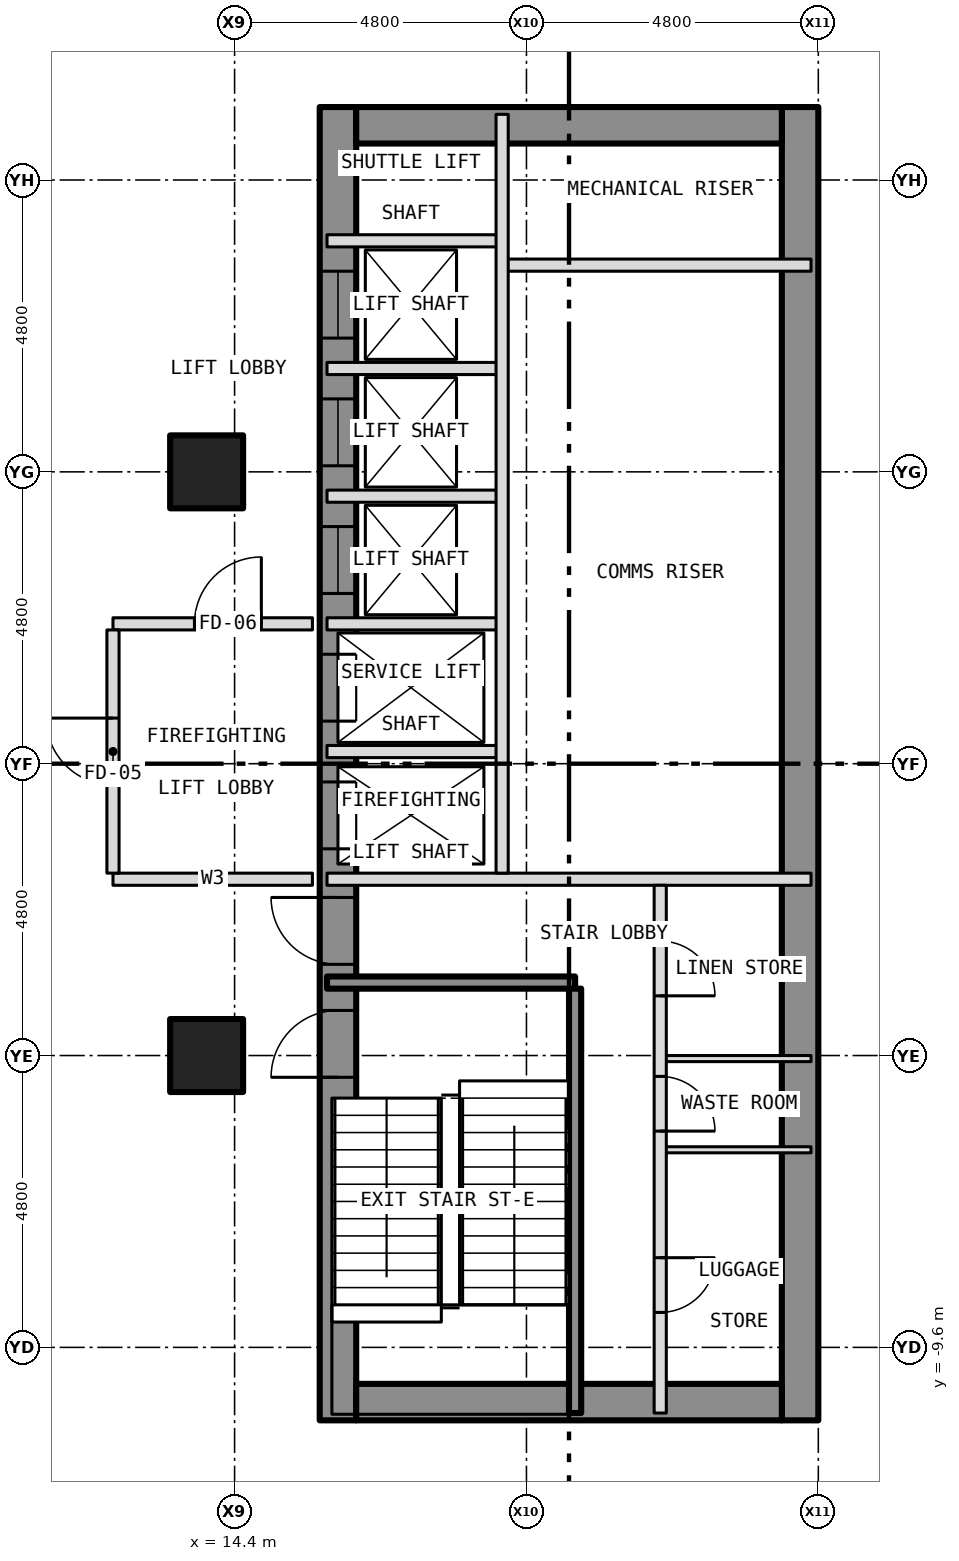
"""IFC4 building model, lengths in metres.
Left out: names, types, materials, properties, quantities, classifications, styles, units other than length and angle.
Written with IfcOpenShell. Run it as: python <this file> out.ifc"""

import sys

from ifc_helpers import new_model, si_unit, direction, frame, frame_2d, origin, origin_2d, place, context, subcontext, project, spatial, rectangle, hollow_rectangle, extrude, element, fill, save


model = new_model("IFC4")
c1 = context("Model", 3, precision=1e-05, world=origin(), true_north=direction((0.0, 1.0)))
c2 = subcontext(c1, "Body", "Model", "MODEL_VIEW")
j1 = project(units=[si_unit("LENGTHUNIT", "METRE"), si_unit("PLANEANGLEUNIT", "RADIAN")], contexts=[c1])
p1 = place(None, origin())
s1 = spatial("IfcSite", under=j1, at=p1, CompositionType="ELEMENT")
p2 = place(p1, origin())
s2 = spatial("IfcBuilding", under=s1, at=p2, CompositionType="ELEMENT")
p3 = place(p2, frame((0.0, 0.0, 24.5)))
s3 = spatial("IfcBuildingStorey", under=s2, at=p3, CompositionType="ELEMENT", Elevation=24.5)
for number, where, z_axis, x_axis in (
    (1, (13.94, -4.8, -0.2), (0.0, 0.0, 1.0), (1.0, 0.0, 0.0)),
    (2, (13.94, 4.8, -0.2), (0.0, 0.0, 1.0), (1.0, 0.0, 0.0)),
):
    element("IfcColumn", number, at=place(p3, frame(where, z_axis=z_axis, x_axis=x_axis)), inside=s3, PredefinedType="COLUMN", context=c2, shape_type="SweptSolid", body=[
        extrude(hollow_rectangle(XDim=1.2, YDim=1.2, WallThickness=0.07, at=origin_2d()), origin(), (0.0, 0.0, 1.0), 4.5),
    ])
p4 = place(p3, frame((16.1, -10.8, 0.0), z_axis=(0.0, 0.0, 1.0), x_axis=(0.0, 1.0, 0.0)))
e3 = element("IfcWall", 3, at=p4, inside=s3, PredefinedType="SHEAR", context=c2, shape_type="SweptSolid", body=[
    extrude(rectangle(XDim=21.6, YDim=0.6, at=frame_2d((10.8, 0.0))), origin(), (0.0, 0.0, 1.0), 4.2),
])
p5 = place(p4, frame((9.4, 0.0, 0.0)))
e4 = element("IfcOpeningElement", 4, at=p5, cuts=e3, PredefinedType="OPENING", context=c2, shape_type="SweptSolid", body=[
    extrude(rectangle(XDim=1.1, YDim=2.1, at=frame_2d((0.55, 1.05))), frame((0.0, 0.312, 0.0), z_axis=(0.0, -1.0, 0.0), x_axis=(1.0, 0.0, 0.0)), (0.0, 0.0, 1.0), 0.624),
])
p6 = place(p4, frame((11.5, 0.0, 0.0)))
e5 = element("IfcOpeningElement", 5, at=p6, cuts=e3, PredefinedType="OPENING", context=c2, shape_type="SweptSolid", body=[
    extrude(rectangle(XDim=1.1, YDim=2.1, at=frame_2d((0.55, 1.05))), frame((0.0, 0.312, 0.0), z_axis=(0.0, -1.0, 0.0), x_axis=(1.0, 0.0, 0.0)), (0.0, 0.0, 1.0), 0.624),
])
p7 = place(p4, frame((13.6, 0.0, 0.0)))
e6 = element("IfcOpeningElement", 6, at=p7, cuts=e3, PredefinedType="OPENING", context=c2, shape_type="SweptSolid", body=[
    extrude(rectangle(XDim=1.1, YDim=2.1, at=frame_2d((0.55, 1.05))), frame((0.0, 0.312, 0.0), z_axis=(0.0, -1.0, 0.0), x_axis=(1.0, 0.0, 0.0)), (0.0, 0.0, 1.0), 0.624),
])
p8 = place(p4, frame((15.7, 0.0, 0.0)))
e7 = element("IfcOpeningElement", 7, at=p8, cuts=e3, PredefinedType="OPENING", context=c2, shape_type="SweptSolid", body=[
    extrude(rectangle(XDim=1.1, YDim=2.1, at=frame_2d((0.55, 1.05))), frame((0.0, 0.312, 0.0), z_axis=(0.0, -1.0, 0.0), x_axis=(1.0, 0.0, 0.0)), (0.0, 0.0, 1.0), 0.624),
])
p9 = place(p4, frame((17.8, 0.0, 0.0)))
e8 = element("IfcOpeningElement", 8, at=p9, cuts=e3, PredefinedType="OPENING", context=c2, shape_type="SweptSolid", body=[
    extrude(rectangle(XDim=1.1, YDim=2.1, at=frame_2d((0.55, 1.05))), frame((0.0, 0.312, 0.0), z_axis=(0.0, -1.0, 0.0), x_axis=(1.0, 0.0, 0.0)), (0.0, 0.0, 1.0), 0.624),
])
p10 = place(p4, frame((5.642, 0.0, 0.0)))
e9 = element("IfcOpeningElement", 9, at=p10, cuts=e3, PredefinedType="OPENING", context=c2, shape_type="SweptSolid", body=[
    extrude(rectangle(XDim=1.1, YDim=2.1, at=frame_2d((0.55, 1.05))), frame((0.0, 0.312, 0.0), z_axis=(0.0, -1.0, 0.0), x_axis=(1.0, 0.0, 0.0)), (0.0, 0.0, 1.0), 0.624),
])
p11 = place(p4, frame((7.5, 0.0, 0.0)))
e10 = element("IfcOpeningElement", 10, at=p11, cuts=e3, PredefinedType="OPENING", context=c2, shape_type="SweptSolid", body=[
    extrude(rectangle(XDim=1.1, YDim=2.1, at=frame_2d((0.55, 1.05))), frame((0.0, 0.312, 0.0), z_axis=(0.0, -1.0, 0.0), x_axis=(1.0, 0.0, 0.0)), (0.0, 0.0, 1.0), 0.624),
])
p12 = place(p3, frame((23.7, -10.8, 0.0), z_axis=(0.0, 0.0, 1.0), x_axis=(0.0, 1.0, 0.0)))
e11 = element("IfcWall", 11, at=p12, inside=s3, PredefinedType="SHEAR", context=c2, shape_type="SweptSolid", body=[
    extrude(rectangle(XDim=21.6, YDim=0.6, at=frame_2d((10.8, 0.0))), origin(), (0.0, 0.0, 1.0), 4.2),
])
for number, where, z_axis, x_axis in (
    (12, (16.4, 10.5, 0.0), (0.0, 0.0, 1.0), (1.0, 0.0, 0.0)),
    (13, (16.4, -10.5, 0.0), (0.0, 0.0, 1.0), (1.0, 0.0, 0.0)),
):
    element("IfcWall", number, at=place(p3, frame(where, z_axis=z_axis, x_axis=x_axis)), inside=s3, PredefinedType="SHEAR", context=c2, shape_type="SweptSolid", body=[
        extrude(rectangle(XDim=7.0, YDim=0.6, at=frame_2d((3.5, 0.0))), origin(), (0.0, 0.0, 1.0), 4.2),
    ])
for number, where, z_axis, x_axis in (
    (14, (21.4, -6.35, 0.0), (0.0, 0.0, 1.0), (1.0, 0.0, 0.0)),
    (15, (21.4, -4.85, 0.0), (0.0, 0.0, 1.0), (1.0, 0.0, 0.0)),
):
    element("IfcWall", number, at=place(p3, frame(where, z_axis=z_axis, x_axis=x_axis)), inside=s3, PredefinedType="PARTITIONING", context=c2, shape_type="SweptSolid", body=[
        extrude(rectangle(XDim=2.48, YDim=0.1, at=frame_2d((1.24, 0.0))), origin(), (0.0, 0.0, 1.0), 4.2),
    ])
p13 = place(p3, frame((15.92, -3.6, 0.0), z_axis=(0.0, 0.0, 1.0), x_axis=(1.0, 0.0, 0.0)))
e16 = element("IfcWall", 16, at=p13, inside=s3, PredefinedType="SHEAR", context=c2, shape_type="SweptSolid", body=[
    extrude(rectangle(XDim=4.08, YDim=0.2, at=frame_2d((2.04, 0.0))), origin(), (0.0, 0.0, 1.0), 4.2),
])
p14 = place(p3, frame((12.4, -1.9, 0.0), z_axis=(0.0, 0.0, 1.0), x_axis=(1.0, 0.0, 0.0)))
e17 = element("IfcWall", 17, at=p14, inside=s3, PredefinedType="PARTITIONING", context=c2, shape_type="SweptSolid", body=[
    extrude(rectangle(XDim=3.28, YDim=0.2, at=frame_2d((1.64, 0.0))), origin(), (0.0, 0.0, 1.0), 4.3),
])
p15 = place(p3, frame((15.92, -1.9, 0.0), z_axis=(0.0, 0.0, 1.0), x_axis=(1.0, 0.0, 0.0)))
e18 = element("IfcWall", 18, at=p15, inside=s3, PredefinedType="PARTITIONING", context=c2, shape_type="SweptSolid", body=[
    extrude(rectangle(XDim=7.96, YDim=0.2, at=frame_2d((3.98, 0.0))), origin(), (0.0, 0.0, 1.0), 4.2),
])
p16 = place(p3, frame((15.92, 0.2, 0.0), z_axis=(0.0, 0.0, 1.0), x_axis=(1.0, 0.0, 0.0)))
e19 = element("IfcWall", 19, at=p16, inside=s3, PredefinedType="PARTITIONING", context=c2, shape_type="SweptSolid", body=[
    extrude(rectangle(XDim=2.88, YDim=0.2, at=frame_2d((1.44, 0.0))), origin(), (0.0, 0.0, 1.0), 4.2),
])
p17 = place(p3, frame((12.4, 2.3, 0.0), z_axis=(0.0, 0.0, 1.0), x_axis=(1.0, 0.0, 0.0)))
e20 = element("IfcWall", 20, at=p17, inside=s3, PredefinedType="PARTITIONING", context=c2, shape_type="SweptSolid", body=[
    extrude(rectangle(XDim=3.28, YDim=0.2, at=frame_2d((1.64, 0.0))), origin(), (0.0, 0.0, 1.0), 4.3),
])
p18 = place(p17, frame((1.34, 0.0, 0.0)))
e21 = element("IfcOpeningElement", 21, at=p18, cuts=e20, PredefinedType="OPENING", context=c2, shape_type="SweptSolid", body=[
    extrude(rectangle(XDim=1.1, YDim=2.1, at=frame_2d((0.55, 1.05))), frame((0.0, 0.112, 0.0), z_axis=(0.0, -1.0, 0.0), x_axis=(1.0, 0.0, 0.0)), (0.0, 0.0, 1.0), 0.224),
])
for number, where, z_axis, x_axis in (
    (22, (15.92, 2.3, 0.0), (0.0, 0.0, 1.0), (1.0, 0.0, 0.0)),
    (23, (15.92, 4.4, 0.0), (0.0, 0.0, 1.0), (1.0, 0.0, 0.0)),
    (24, (15.92, 6.5, 0.0), (0.0, 0.0, 1.0), (1.0, 0.0, 0.0)),
):
    element("IfcWall", number, at=place(p3, frame(where, z_axis=z_axis, x_axis=x_axis)), inside=s3, PredefinedType="PARTITIONING", context=c2, shape_type="SweptSolid", body=[
        extrude(rectangle(XDim=2.88, YDim=0.2, at=frame_2d((1.44, 0.0))), origin(), (0.0, 0.0, 1.0), 4.2),
    ])
p19 = place(p3, frame((18.8, 8.2, 0.0), z_axis=(0.0, 0.0, 1.0), x_axis=(1.0, 0.0, 0.0)))
e25 = element("IfcWall", 25, at=p19, inside=s3, PredefinedType="PARTITIONING", context=c2, shape_type="SweptSolid", body=[
    extrude(rectangle(XDim=5.08, YDim=0.2, at=frame_2d((2.54, 0.0))), origin(), (0.0, 0.0, 1.0), 4.2),
])
p20 = place(p3, frame((15.92, 8.6, 0.0), z_axis=(0.0, 0.0, 1.0), x_axis=(1.0, 0.0, 0.0)))
e26 = element("IfcWall", 26, at=p20, inside=s3, PredefinedType="PARTITIONING", context=c2, shape_type="SweptSolid", body=[
    extrude(rectangle(XDim=2.88, YDim=0.2, at=frame_2d((1.44, 0.0))), origin(), (0.0, 0.0, 1.0), 4.2),
])
p21 = place(p3, frame((12.4, -1.8, 0.0), z_axis=(0.0, 0.0, 1.0), x_axis=(0.0, 1.0, 0.0)))
e27 = element("IfcWall", 27, at=p21, inside=s3, PredefinedType="PARTITIONING", context=c2, shape_type="SweptSolid", body=[
    extrude(rectangle(XDim=4.0, YDim=0.2, at=frame_2d((2.0, 0.0))), origin(), (0.0, 0.0, 1.0), 4.3),
])
p22 = place(p21, frame((1.45, 0.0, 0.0)))
e28 = element("IfcOpeningElement", 28, at=p22, cuts=e27, PredefinedType="OPENING", context=c2, shape_type="SweptSolid", body=[
    extrude(rectangle(XDim=1.1, YDim=2.1, at=frame_2d((0.55, 1.05))), frame((0.0, 0.112, 0.0), z_axis=(0.0, -1.0, 0.0), x_axis=(1.0, 0.0, 0.0)), (0.0, 0.0, 1.0), 0.224),
])
p23 = place(p3, frame((18.8, -1.8, 0.0), z_axis=(0.0, 0.0, 1.0), x_axis=(0.0, 1.0, 0.0)))
e29 = element("IfcWall", 29, at=p23, inside=s3, PredefinedType="PARTITIONING", context=c2, shape_type="SweptSolid", body=[
    extrude(rectangle(XDim=12.48, YDim=0.2, at=frame_2d((6.24, 0.0))), origin(), (0.0, 0.0, 1.0), 4.2),
])
p24 = place(p3, frame((20.0, -10.68, 0.0), z_axis=(0.0, 0.0, 1.0), x_axis=(0.0, 1.0, 0.0)))
e30 = element("IfcWall", 30, at=p24, inside=s3, PredefinedType="SHEAR", context=c2, shape_type="SweptSolid", body=[
    extrude(rectangle(XDim=6.98, YDim=0.2, at=frame_2d((3.49, 0.0))), origin(), (0.0, 0.0, 1.0), 4.2),
])
p25 = place(p3, frame((21.4, -10.68, 0.0), z_axis=(0.0, 0.0, 1.0), x_axis=(0.0, 1.0, 0.0)))
e31 = element("IfcWall", 31, at=p25, inside=s3, PredefinedType="PARTITIONING", context=c2, shape_type="SweptSolid", body=[
    extrude(rectangle(XDim=8.68, YDim=0.2, at=frame_2d((4.34, 0.0))), origin(), (0.0, 0.0, 1.0), 4.2),
])
p26 = place(p25, frame((1.655, 0.0, 0.0)))
e32 = element("IfcOpeningElement", 32, at=p26, cuts=e31, PredefinedType="OPENING", context=c2, shape_type="SweptSolid", body=[
    extrude(rectangle(XDim=0.9, YDim=2.1, at=frame_2d((0.45, 1.05))), frame((0.0, 0.112, 0.0), z_axis=(0.0, -1.0, 0.0), x_axis=(1.0, 0.0, 0.0)), (0.0, 0.0, 1.0), 0.224),
])
p27 = place(p25, frame((4.637, 0.0, 0.0)))
e33 = element("IfcOpeningElement", 33, at=p27, cuts=e31, PredefinedType="OPENING", context=c2, shape_type="SweptSolid", body=[
    extrude(rectangle(XDim=0.9, YDim=2.1, at=frame_2d((0.45, 1.05))), frame((0.0, 0.112, 0.0), z_axis=(0.0, -1.0, 0.0), x_axis=(1.0, 0.0, 0.0)), (0.0, 0.0, 1.0), 0.224),
])
p28 = place(p25, frame((6.862, 0.0, 0.0)))
e34 = element("IfcOpeningElement", 34, at=p28, cuts=e31, PredefinedType="OPENING", context=c2, shape_type="SweptSolid", body=[
    extrude(rectangle(XDim=0.9, YDim=2.1, at=frame_2d((0.45, 1.05))), frame((0.0, 0.112, 0.0), z_axis=(0.0, -1.0, 0.0), x_axis=(1.0, 0.0, 0.0)), (0.0, 0.0, 1.0), 0.224),
])
p29 = place(p5, origin())
e35 = element("IfcDoor", 35, at=p29, inside=s3, OperationType="SLIDING_TO_LEFT", PredefinedType="DOOR", context=c2, shape_type="SweptSolid", body=[
    extrude(rectangle(XDim=1.1, YDim=2.1, at=frame_2d((0.55, 1.05))), frame((0.0, 0.025, 0.0), z_axis=(0.0, -1.0, 0.0), x_axis=(1.0, 0.0, 0.0)), (0.0, 0.0, 1.0), 0.05),
])
fill(e4, e35)
p30 = place(p6, origin())
e36 = element("IfcDoor", 36, at=p30, inside=s3, OperationType="SLIDING_TO_LEFT", PredefinedType="DOOR", context=c2, shape_type="SweptSolid", body=[
    extrude(rectangle(XDim=1.1, YDim=2.1, at=frame_2d((0.55, 1.05))), frame((0.0, 0.025, 0.0), z_axis=(0.0, -1.0, 0.0), x_axis=(1.0, 0.0, 0.0)), (0.0, 0.0, 1.0), 0.05),
])
fill(e5, e36)
p31 = place(p7, origin())
e37 = element("IfcDoor", 37, at=p31, inside=s3, OperationType="SLIDING_TO_LEFT", PredefinedType="DOOR", context=c2, shape_type="SweptSolid", body=[
    extrude(rectangle(XDim=1.1, YDim=2.1, at=frame_2d((0.55, 1.05))), frame((0.0, 0.025, 0.0), z_axis=(0.0, -1.0, 0.0), x_axis=(1.0, 0.0, 0.0)), (0.0, 0.0, 1.0), 0.05),
])
fill(e6, e37)
p32 = place(p8, origin())
e38 = element("IfcDoor", 38, at=p32, inside=s3, OperationType="SLIDING_TO_LEFT", PredefinedType="DOOR", context=c2, shape_type="SweptSolid", body=[
    extrude(rectangle(XDim=1.1, YDim=2.1, at=frame_2d((0.55, 1.05))), frame((0.0, 0.025, 0.0), z_axis=(0.0, -1.0, 0.0), x_axis=(1.0, 0.0, 0.0)), (0.0, 0.0, 1.0), 0.05),
])
fill(e7, e38)
p33 = place(p9, origin())
e39 = element("IfcDoor", 39, at=p33, inside=s3, OperationType="SLIDING_TO_LEFT", PredefinedType="DOOR", context=c2, shape_type="SweptSolid", body=[
    extrude(rectangle(XDim=1.1, YDim=2.1, at=frame_2d((0.55, 1.05))), frame((0.0, 0.025, 0.0), z_axis=(0.0, -1.0, 0.0), x_axis=(1.0, 0.0, 0.0)), (0.0, 0.0, 1.0), 0.05),
])
fill(e8, e39)
p34 = place(p10, origin())
e40 = element("IfcDoor", 40, at=p34, inside=s3, OperationType="SINGLE_SWING_LEFT", PredefinedType="DOOR", context=c2, shape_type="SweptSolid", body=[
    extrude(rectangle(XDim=1.1, YDim=2.1, at=frame_2d((0.55, 1.05))), frame((0.0, 0.025, 0.0), z_axis=(0.0, -1.0, 0.0), x_axis=(1.0, 0.0, 0.0)), (0.0, 0.0, 1.0), 0.05),
])
fill(e9, e40)
p35 = place(p11, origin())
e41 = element("IfcDoor", 41, at=p35, inside=s3, OperationType="SINGLE_SWING_RIGHT", PredefinedType="DOOR", context=c2, shape_type="SweptSolid", body=[
    extrude(rectangle(XDim=1.1, YDim=2.1, at=frame_2d((0.55, 1.05))), frame((0.0, 0.025, 0.0), z_axis=(0.0, -1.0, 0.0), x_axis=(1.0, 0.0, 0.0)), (0.0, 0.0, 1.0), 0.05),
])
fill(e10, e41)
p36 = place(p26, origin())
e42 = element("IfcDoor", 42, at=p36, inside=s3, OperationType="SINGLE_SWING_RIGHT", PredefinedType="DOOR", context=c2, shape_type="SweptSolid", body=[
    extrude(rectangle(XDim=0.9, YDim=2.1, at=frame_2d((0.45, 1.05))), frame((0.0, 0.025, 0.0), z_axis=(0.0, -1.0, 0.0), x_axis=(1.0, 0.0, 0.0)), (0.0, 0.0, 1.0), 0.05),
])
fill(e32, e42)
p37 = place(p27, origin())
e43 = element("IfcDoor", 43, at=p37, inside=s3, OperationType="SINGLE_SWING_LEFT", PredefinedType="DOOR", context=c2, shape_type="SweptSolid", body=[
    extrude(rectangle(XDim=0.9, YDim=2.1, at=frame_2d((0.45, 1.05))), frame((0.0, 0.025, 0.0), z_axis=(0.0, -1.0, 0.0), x_axis=(1.0, 0.0, 0.0)), (0.0, 0.0, 1.0), 0.05),
])
fill(e33, e43)
p38 = place(p28, origin())
e44 = element("IfcDoor", 44, at=p38, inside=s3, OperationType="SINGLE_SWING_LEFT", PredefinedType="DOOR", context=c2, shape_type="SweptSolid", body=[
    extrude(rectangle(XDim=0.9, YDim=2.1, at=frame_2d((0.45, 1.05))), frame((0.0, 0.025, 0.0), z_axis=(0.0, -1.0, 0.0), x_axis=(1.0, 0.0, 0.0)), (0.0, 0.0, 1.0), 0.05),
])
fill(e34, e44)
p39 = place(p22, origin())
e45 = element("IfcDoor", 45, at=p39, inside=s3, OperationType="SINGLE_SWING_RIGHT", PredefinedType="DOOR", context=c2, shape_type="SweptSolid", body=[
    extrude(rectangle(XDim=1.1, YDim=2.1, at=frame_2d((0.55, 1.05))), frame((0.0, 0.025, 0.0), z_axis=(0.0, -1.0, 0.0), x_axis=(1.0, 0.0, 0.0)), (0.0, 0.0, 1.0), 0.05),
])
fill(e28, e45)
p40 = place(p18, origin())
e46 = element("IfcDoor", 46, at=p40, inside=s3, OperationType="SINGLE_SWING_RIGHT", PredefinedType="DOOR", context=c2, shape_type="SweptSolid", body=[
    extrude(rectangle(XDim=1.1, YDim=2.1, at=frame_2d((0.55, 1.05))), frame((0.0, 0.025, 0.0), z_axis=(0.0, -1.0, 0.0), x_axis=(1.0, 0.0, 0.0)), (0.0, 0.0, 1.0), 0.05),
])
fill(e21, e46)
save(model, sys.argv[1])
